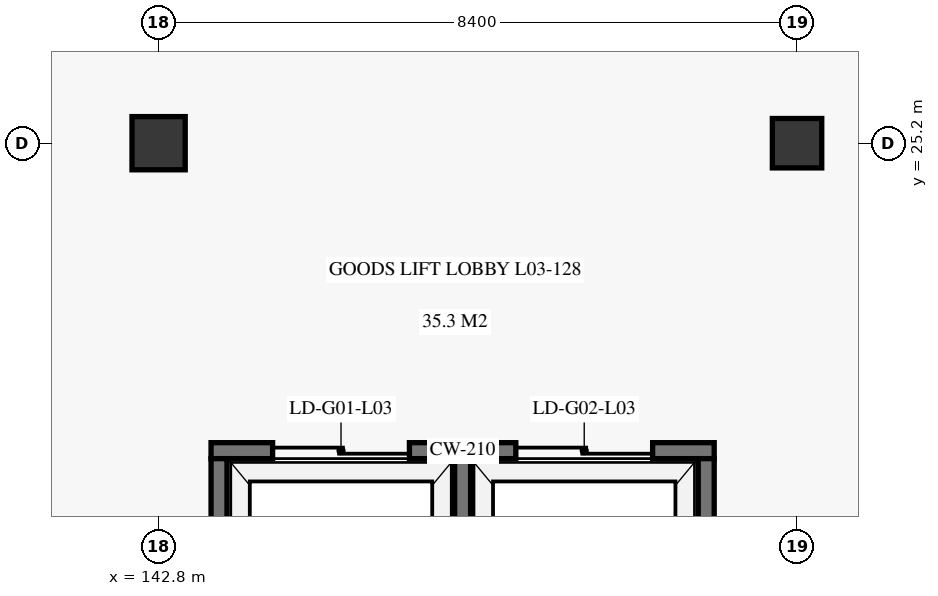
"""IFC4 building model, lengths in metres.
Left out: names, types, materials, properties, quantities, classifications, styles, units other than length and angle.
Written with IfcOpenShell. Run it as: python <this file> out.ifc"""

import sys

from ifc_helpers import new_model, si_unit, direction, frame, frame_2d, origin, origin_2d, place, context, subcontext, project, spatial, rectangle, extrude, element, fill, save


model = new_model("IFC4")
c1 = context("Model", 3, precision=1e-05, world=origin(), true_north=direction((0.0, 1.0)))
c2 = subcontext(c1, "Body", "Model", "MODEL_VIEW")
j1 = project(units=[si_unit("LENGTHUNIT", "METRE"), si_unit("PLANEANGLEUNIT", "RADIAN")], contexts=[c1])
p1 = place(None, origin())
s1 = spatial("IfcSite", under=j1, at=p1, CompositionType="ELEMENT")
p2 = place(p1, origin())
s2 = spatial("IfcBuilding", under=s1, at=p2, CompositionType="ELEMENT")
p3 = place(p2, frame((0.0, 0.0, 11.4)))
s3 = spatial("IfcBuildingStorey", under=s2, at=p3, CompositionType="ELEMENT", Elevation=11.4)
p4 = place(p3, frame((142.8, 25.2, 0.0), z_axis=(0.0, 0.0, 1.0), x_axis=(1.0, 0.0, 0.0)))
e1 = element("IfcColumn", 1, at=p4, inside=s3, PredefinedType="COLUMN", context=c2, shape_type="SweptSolid", body=[
    extrude(rectangle(XDim=0.7, YDim=0.7, at=origin_2d()), origin(), (0.0, 0.0, 1.0), 5.1),
])
p5 = place(p3, frame((151.2, 25.2, 0.0), z_axis=(0.0, 0.0, 1.0), x_axis=(1.0, 0.0, 0.0)))
e2 = element("IfcColumn", 2, at=p5, inside=s3, PredefinedType="COLUMN", context=c2, shape_type="SweptSolid", body=[
    extrude(rectangle(XDim=0.65, YDim=0.65, at=origin_2d()), origin(), (0.0, 0.0, 1.0), 5.1),
])
p6 = place(p3, frame((143.49, 21.155, 0.0), z_axis=(0.0, 0.0, 1.0), x_axis=(1.0, 0.0, 0.0)))
e3 = element("IfcWall", 3, at=p6, inside=s3, PredefinedType="SHEAR", context=c2, shape_type="SweptSolid", body=[
    extrude(rectangle(XDim=6.62, YDim=0.21, at=frame_2d((3.31, 0.0))), origin(), (0.0, 0.0, 1.0), 5.1),
])
p7 = place(p6, frame((0.81, 0.0, 0.0)))
e4 = element("IfcOpeningElement", 4, at=p7, cuts=e3, PredefinedType="OPENING", context=c2, shape_type="SweptSolid", body=[
    extrude(rectangle(XDim=1.8, YDim=2.45, at=frame_2d((0.9, 1.225))), frame((0.0, 0.115, 0.0), z_axis=(0.0, -1.0, 0.0), x_axis=(1.0, 0.0, 0.0)), (0.0, 0.0, 1.0), 0.23),
])
p8 = place(p6, frame((4.01, 0.0, 0.0)))
e5 = element("IfcOpeningElement", 5, at=p8, cuts=e3, PredefinedType="OPENING", context=c2, shape_type="SweptSolid", body=[
    extrude(rectangle(XDim=1.8, YDim=2.45, at=frame_2d((0.9, 1.225))), frame((0.0, 0.115, 0.0), z_axis=(0.0, -1.0, 0.0), x_axis=(1.0, 0.0, 0.0)), (0.0, 0.0, 1.0), 0.23),
])
for number, where, z_axis, x_axis in (
    (6, (143.595, 17.45, 0.0), (0.0, 0.0, 1.0), (0.0, 1.0, 0.0)),
    (7, (150.005, 17.45, 0.0), (0.0, 0.0, 1.0), (0.0, 1.0, 0.0)),
    (8, (146.8, 17.45, 0.0), (0.0, 0.0, 1.0), (0.0, 1.0, 0.0)),
):
    element("IfcWall", number, at=place(p3, frame(where, z_axis=z_axis, x_axis=x_axis)), inside=s3, PredefinedType="SHEAR", context=c2, shape_type="SweptSolid", body=[
        extrude(rectangle(XDim=3.6, YDim=0.21, at=frame_2d((1.8, 0.0))), origin(), (0.0, 0.0, 1.0), 5.1),
    ])
p9 = place(p7, origin())
e9 = element("IfcDoor", 9, at=p9, inside=s3, OperationType="DOUBLE_DOOR_SLIDING", PredefinedType="DOOR", context=c2, shape_type="SweptSolid", body=[
    extrude(rectangle(XDim=1.8, YDim=2.45, at=frame_2d((0.9, 1.225))), frame((0.0, 0.025, 0.0), z_axis=(0.0, -1.0, 0.0), x_axis=(1.0, 0.0, 0.0)), (0.0, 0.0, 1.0), 0.05),
])
fill(e4, e9)
p10 = place(p8, origin())
e10 = element("IfcDoor", 10, at=p10, inside=s3, OperationType="DOUBLE_DOOR_SLIDING", PredefinedType="DOOR", context=c2, shape_type="SweptSolid", body=[
    extrude(rectangle(XDim=1.8, YDim=2.45, at=frame_2d((0.9, 1.225))), frame((0.0, 0.025, 0.0), z_axis=(0.0, -1.0, 0.0), x_axis=(1.0, 0.0, 0.0)), (0.0, 0.0, 1.0), 0.05),
])
fill(e5, e10)
save(model, sys.argv[1])
